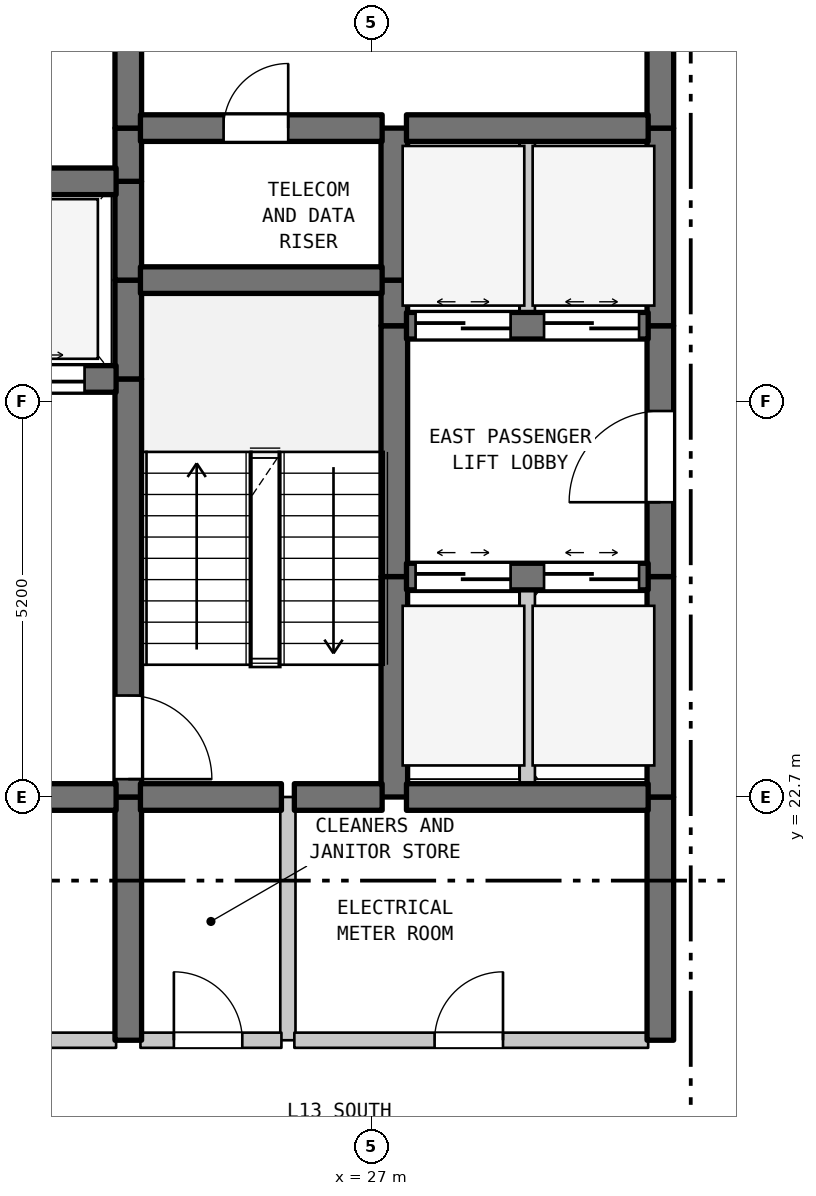
"""IFC4 building model, lengths in metres.
Left out: names, types, materials, properties, quantities, classifications, styles, units other than length and angle.
Written with IfcOpenShell. Run it as: python <this file> out.ifc"""

import sys

from ifc_helpers import new_model, si_unit, direction, frame, frame_2d, origin, place, context, subcontext, project, spatial, rectangle, extrude, element, fill, save


model = new_model("IFC4")
c1 = context("Model", 3, precision=1e-05, world=origin(), true_north=direction((0.0, 1.0)))
c2 = subcontext(c1, "Body", "Model", "MODEL_VIEW")
j1 = project(units=[si_unit("LENGTHUNIT", "METRE"), si_unit("PLANEANGLEUNIT", "RADIAN")], contexts=[c1])
p1 = place(None, origin())
s1 = spatial("IfcSite", under=j1, at=p1, CompositionType="ELEMENT")
p2 = place(p1, origin())
s2 = spatial("IfcBuilding", under=s1, at=p2, CompositionType="ELEMENT")
p3 = place(p2, frame((0.0, 0.0, 57.3)))
s3 = spatial("IfcBuildingStorey", under=s2, at=p3, CompositionType="ELEMENT", Elevation=57.3)
p4 = place(p3, frame((23.8, 19.5, 0.0), z_axis=(0.0, 0.0, 1.0), x_axis=(0.0, 1.0, 0.0)))
e1 = element("IfcWall", 1, at=p4, inside=s3, PredefinedType="SHEAR", context=c2, shape_type="SweptSolid", body=[
    extrude(rectangle(XDim=3.2, YDim=0.35, at=frame_2d((1.6, 0.0))), origin(), (0.0, 0.0, 1.0), 3.28),
])
p5 = place(p3, frame((23.8, 22.7, 0.0), z_axis=(0.0, 0.0, 1.0), x_axis=(0.0, 1.0, 0.0)))
e2 = element("IfcWall", 2, at=p5, inside=s3, PredefinedType="SHEAR", context=c2, shape_type="SweptSolid", body=[
    extrude(rectangle(XDim=5.5, YDim=0.35, at=frame_2d((2.75, 0.0))), origin(), (0.0, 0.0, 1.0), 3.28),
])
p6 = place(p5, frame((0.235, 0.0, 0.0)))
e3 = element("IfcOpeningElement", 3, at=p6, cuts=e2, PredefinedType="OPENING", context=c2, shape_type="SweptSolid", body=[
    extrude(rectangle(XDim=1.1, YDim=2.15, at=frame_2d((0.55, 1.075))), frame((0.0, 0.185, 0.0), z_axis=(0.0, -1.0, 0.0), x_axis=(1.0, 0.0, 0.0)), (0.0, 0.0, 1.0), 0.37),
])
for number, where, z_axis, x_axis in (
    (4, (23.8, 28.2, 0.0), (0.0, 0.0, 1.0), (0.0, 1.0, 0.0)),
    (5, (23.8, 29.5, 0.0), (0.0, 0.0, 1.0), (0.0, 1.0, 0.0)),
):
    element("IfcWall", number, at=place(p3, frame(where, z_axis=z_axis, x_axis=x_axis)), inside=s3, PredefinedType="SHEAR", context=c2, shape_type="SweptSolid", body=[
        extrude(rectangle(XDim=1.3, YDim=0.35, at=frame_2d((0.65, 0.0))), origin(), (0.0, 0.0, 1.0), 3.28),
    ])
p7 = place(p3, frame((23.8, 30.8, 0.0), z_axis=(0.0, 0.0, 1.0), x_axis=(0.0, 1.0, 0.0)))
e6 = element("IfcWall", 6, at=p7, inside=s3, PredefinedType="SHEAR", context=c2, shape_type="SweptSolid", body=[
    extrude(rectangle(XDim=0.7, YDim=0.35, at=frame_2d((0.35, 0.0))), origin(), (0.0, 0.0, 1.0), 3.28),
])
p8 = place(p3, frame((23.8, 31.5, 0.0), z_axis=(0.0, 0.0, 1.0), x_axis=(0.0, 1.0, 0.0)))
e7 = element("IfcWall", 7, at=p8, inside=s3, PredefinedType="SHEAR", context=c2, shape_type="SweptSolid", body=[
    extrude(rectangle(XDim=3.5, YDim=0.35, at=frame_2d((1.75, 0.0))), origin(), (0.0, 0.0, 1.0), 3.28),
])
p9 = place(p8, frame((1.127, 0.0, 0.0)))
e8 = element("IfcOpeningElement", 8, at=p9, cuts=e7, PredefinedType="OPENING", context=c2, shape_type="SweptSolid", body=[
    extrude(rectangle(XDim=1.1, YDim=2.15, at=frame_2d((0.55, 1.075))), frame((0.0, 0.185, 0.0), z_axis=(0.0, -1.0, 0.0), x_axis=(1.0, 0.0, 0.0)), (0.0, 0.0, 1.0), 0.37),
])
p10 = place(p3, frame((25.9, 19.5, 0.0), z_axis=(0.0, 0.0, 1.0), x_axis=(0.0, 1.0, 0.0)))
e9 = element("IfcWall", 9, at=p10, inside=s3, PredefinedType="STANDARD", context=c2, shape_type="SweptSolid", body=[
    extrude(rectangle(XDim=3.2, YDim=0.2, at=frame_2d((1.6, 0.0))), origin(), (0.0, 0.0, 1.0), 3.28),
])
p11 = place(p3, frame((27.3, 22.7, 0.0), z_axis=(0.0, 0.0, 1.0), x_axis=(0.0, 1.0, 0.0)))
e10 = element("IfcWall", 10, at=p11, inside=s3, PredefinedType="SHEAR", context=c2, shape_type="SweptSolid", body=[
    extrude(rectangle(XDim=2.9, YDim=0.35, at=frame_2d((1.45, 0.0))), origin(), (0.0, 0.0, 1.0), 3.28),
])
p12 = place(p3, frame((27.3, 25.6, 0.0), z_axis=(0.0, 0.0, 1.0), x_axis=(0.0, 1.0, 0.0)))
e11 = element("IfcWall", 11, at=p12, inside=s3, PredefinedType="SHEAR", context=c2, shape_type="SweptSolid", body=[
    extrude(rectangle(XDim=3.3, YDim=0.35, at=frame_2d((1.65, 0.0))), origin(), (0.0, 0.0, 1.0), 3.28),
])
p13 = place(p3, frame((27.3, 28.9, 0.0), z_axis=(0.0, 0.0, 1.0), x_axis=(0.0, 1.0, 0.0)))
e12 = element("IfcWall", 12, at=p13, inside=s3, PredefinedType="SHEAR", context=c2, shape_type="SweptSolid", body=[
    extrude(rectangle(XDim=0.6, YDim=0.35, at=frame_2d((0.3, 0.0))), origin(), (0.0, 0.0, 1.0), 3.28),
])
p14 = place(p3, frame((27.3, 29.5, 0.0), z_axis=(0.0, 0.0, 1.0), x_axis=(0.0, 1.0, 0.0)))
e13 = element("IfcWall", 13, at=p14, inside=s3, PredefinedType="SHEAR", context=c2, shape_type="SweptSolid", body=[
    extrude(rectangle(XDim=2.0, YDim=0.35, at=frame_2d((1.0, 0.0))), origin(), (0.0, 0.0, 1.0), 3.28),
])
p15 = place(p3, frame((29.05, 22.7, 0.0), z_axis=(0.0, 0.0, 1.0), x_axis=(0.0, 1.0, 0.0)))
e14 = element("IfcWall", 14, at=p15, inside=s3, PredefinedType="STANDARD", context=c2, shape_type="SweptSolid", body=[
    extrude(rectangle(XDim=2.9, YDim=0.2, at=frame_2d((1.45, 0.0))), origin(), (0.0, 0.0, 1.0), 3.28),
])
p16 = place(p3, frame((29.05, 28.9, 0.0), z_axis=(0.0, 0.0, 1.0), x_axis=(0.0, 1.0, 0.0)))
e15 = element("IfcWall", 15, at=p16, inside=s3, PredefinedType="STANDARD", context=c2, shape_type="SweptSolid", body=[
    extrude(rectangle(XDim=2.6, YDim=0.2, at=frame_2d((1.3, 0.0))), origin(), (0.0, 0.0, 1.0), 3.28),
])
p17 = place(p3, frame((30.8, 19.5, 0.0), z_axis=(0.0, 0.0, 1.0), x_axis=(0.0, 1.0, 0.0)))
e16 = element("IfcWall", 16, at=p17, inside=s3, PredefinedType="SHEAR", context=c2, shape_type="SweptSolid", body=[
    extrude(rectangle(XDim=3.2, YDim=0.35, at=frame_2d((1.6, 0.0))), origin(), (0.0, 0.0, 1.0), 3.28),
])
p18 = place(p3, frame((30.8, 22.7, 0.0), z_axis=(0.0, 0.0, 1.0), x_axis=(0.0, 1.0, 0.0)))
e17 = element("IfcWall", 17, at=p18, inside=s3, PredefinedType="SHEAR", context=c2, shape_type="SweptSolid", body=[
    extrude(rectangle(XDim=2.9, YDim=0.35, at=frame_2d((1.45, 0.0))), origin(), (0.0, 0.0, 1.0), 3.28),
])
p19 = place(p3, frame((30.8, 25.6, 0.0), z_axis=(0.0, 0.0, 1.0), x_axis=(0.0, 1.0, 0.0)))
e18 = element("IfcWall", 18, at=p19, inside=s3, PredefinedType="SHEAR", context=c2, shape_type="SweptSolid", body=[
    extrude(rectangle(XDim=3.3, YDim=0.35, at=frame_2d((1.65, 0.0))), origin(), (0.0, 0.0, 1.0), 3.28),
])
p20 = place(p19, frame((0.978, 0.0, 0.0)))
e19 = element("IfcOpeningElement", 19, at=p20, cuts=e18, PredefinedType="OPENING", context=c2, shape_type="SweptSolid", body=[
    extrude(rectangle(XDim=1.2, YDim=2.2, at=frame_2d((0.6, 1.1))), frame((0.0, 0.185, 0.0), z_axis=(0.0, -1.0, 0.0), x_axis=(1.0, 0.0, 0.0)), (0.0, 0.0, 1.0), 0.37),
])
p21 = place(p3, frame((30.8, 28.9, 0.0), z_axis=(0.0, 0.0, 1.0), x_axis=(0.0, 1.0, 0.0)))
e20 = element("IfcWall", 20, at=p21, inside=s3, PredefinedType="SHEAR", context=c2, shape_type="SweptSolid", body=[
    extrude(rectangle(XDim=2.6, YDim=0.35, at=frame_2d((1.3, 0.0))), origin(), (0.0, 0.0, 1.0), 3.28),
])
p22 = place(p3, frame((30.8, 31.5, 0.0), z_axis=(0.0, 0.0, 1.0), x_axis=(0.0, 1.0, 0.0)))
e21 = element("IfcWall", 21, at=p22, inside=s3, PredefinedType="SHEAR", context=c2, shape_type="SweptSolid", body=[
    extrude(rectangle(XDim=3.5, YDim=0.35, at=frame_2d((1.75, 0.0))), origin(), (0.0, 0.0, 1.0), 3.28),
])
p23 = place(p22, frame((1.15, 0.0, 0.0)))
e22 = element("IfcOpeningElement", 22, at=p23, cuts=e21, PredefinedType="OPENING", context=c2, shape_type="SweptSolid", body=[
    extrude(rectangle(XDim=1.2, YDim=2.2, at=frame_2d((0.6, 1.1))), frame((0.0, 0.185, 0.0), z_axis=(0.0, -1.0, 0.0), x_axis=(1.0, 0.0, 0.0)), (0.0, 0.0, 1.0), 0.37),
])
p24 = place(p3, frame((19.16, 19.5, 0.0), z_axis=(0.0, 0.0, 1.0), x_axis=(1.0, 0.0, 0.0)))
e23 = element("IfcWall", 23, at=p24, inside=s3, PredefinedType="STANDARD", context=c2, shape_type="SweptSolid", body=[
    extrude(rectangle(XDim=4.48, YDim=0.2, at=frame_2d((2.24, 0.0))), origin(), (0.0, 0.0, 1.0), 3.28),
])
p25 = place(p24, frame((1.64, 0.0, 0.0)))
e24 = element("IfcOpeningElement", 24, at=p25, cuts=e23, PredefinedType="OPENING", context=c2, shape_type="SweptSolid", body=[
    extrude(rectangle(XDim=1.2, YDim=2.2, at=frame_2d((0.6, 1.1))), frame((0.0, 0.11, 0.0), z_axis=(0.0, -1.0, 0.0), x_axis=(1.0, 0.0, 0.0)), (0.0, 0.0, 1.0), 0.22),
])
p26 = place(p3, frame((23.96, 19.5, 0.0), z_axis=(0.0, 0.0, 1.0), x_axis=(1.0, 0.0, 0.0)))
e25 = element("IfcWall", 25, at=p26, inside=s3, PredefinedType="STANDARD", context=c2, shape_type="SweptSolid", body=[
    extrude(rectangle(XDim=1.855, YDim=0.2, at=frame_2d((0.927, 0.0))), origin(), (0.0, 0.0, 1.0), 3.28),
])
p27 = place(p26, frame((0.44, 0.0, 0.0)))
e26 = element("IfcOpeningElement", 26, at=p27, cuts=e25, PredefinedType="OPENING", context=c2, shape_type="SweptSolid", body=[
    extrude(rectangle(XDim=0.9, YDim=2.15, at=frame_2d((0.45, 1.075))), frame((0.0, 0.11, 0.0), z_axis=(0.0, -1.0, 0.0), x_axis=(1.0, 0.0, 0.0)), (0.0, 0.0, 1.0), 0.22),
])
p28 = place(p3, frame((25.985, 19.5, 0.0), z_axis=(0.0, 0.0, 1.0), x_axis=(1.0, 0.0, 0.0)))
e27 = element("IfcWall", 27, at=p28, inside=s3, PredefinedType="STANDARD", context=c2, shape_type="SweptSolid", body=[
    extrude(rectangle(XDim=4.655, YDim=0.2, at=frame_2d((2.327, 0.0))), origin(), (0.0, 0.0, 1.0), 3.28),
])
p29 = place(p28, frame((1.845, 0.0, 0.0)))
e28 = element("IfcOpeningElement", 28, at=p29, cuts=e27, PredefinedType="OPENING", context=c2, shape_type="SweptSolid", body=[
    extrude(rectangle(XDim=0.9, YDim=2.15, at=frame_2d((0.45, 1.075))), frame((0.0, 0.11, 0.0), z_axis=(0.0, -1.0, 0.0), x_axis=(1.0, 0.0, 0.0)), (0.0, 0.0, 1.0), 0.22),
])
p30 = place(p3, frame((19.16, 22.7, 0.0), z_axis=(0.0, 0.0, 1.0), x_axis=(1.0, 0.0, 0.0)))
e29 = element("IfcWall", 29, at=p30, inside=s3, PredefinedType="SHEAR", context=c2, shape_type="SweptSolid", body=[
    extrude(rectangle(XDim=4.48, YDim=0.35, at=frame_2d((2.24, 0.0))), origin(), (0.0, 0.0, 1.0), 3.28),
])
p31 = place(p30, frame((1.64, 0.0, 0.0)))
e30 = element("IfcOpeningElement", 30, at=p31, cuts=e29, PredefinedType="OPENING", context=c2, shape_type="SweptSolid", body=[
    extrude(rectangle(XDim=1.2, YDim=2.2, at=frame_2d((0.6, 1.1))), frame((0.0, 0.185, 0.0), z_axis=(0.0, -1.0, 0.0), x_axis=(1.0, 0.0, 0.0)), (0.0, 0.0, 1.0), 0.37),
])
p32 = place(p3, frame((23.96, 22.7, 0.0), z_axis=(0.0, 0.0, 1.0), x_axis=(1.0, 0.0, 0.0)))
e31 = element("IfcWall", 31, at=p32, inside=s3, PredefinedType="SHEAR", context=c2, shape_type="SweptSolid", body=[
    extrude(rectangle(XDim=1.855, YDim=0.35, at=frame_2d((0.927, 0.0))), origin(), (0.0, 0.0, 1.0), 3.28),
])
p33 = place(p3, frame((25.985, 22.7, 0.0), z_axis=(0.0, 0.0, 1.0), x_axis=(1.0, 0.0, 0.0)))
e32 = element("IfcWall", 32, at=p33, inside=s3, PredefinedType="SHEAR", context=c2, shape_type="SweptSolid", body=[
    extrude(rectangle(XDim=1.155, YDim=0.35, at=frame_2d((0.577, 0.0))), origin(), (0.0, 0.0, 1.0), 3.28),
])
p34 = place(p3, frame((27.46, 22.7, 0.0), z_axis=(0.0, 0.0, 1.0), x_axis=(1.0, 0.0, 0.0)))
e33 = element("IfcWall", 33, at=p34, inside=s3, PredefinedType="SHEAR", context=c2, shape_type="SweptSolid", body=[
    extrude(rectangle(XDim=3.18, YDim=0.35, at=frame_2d((1.59, 0.0))), origin(), (0.0, 0.0, 1.0), 3.28),
])
p35 = place(p3, frame((27.46, 25.6, 0.0), z_axis=(0.0, 0.0, 1.0), x_axis=(1.0, 0.0, 0.0)))
e34 = element("IfcWall", 34, at=p35, inside=s3, PredefinedType="SHEAR", context=c2, shape_type="SweptSolid", body=[
    extrude(rectangle(XDim=3.18, YDim=0.35, at=frame_2d((1.59, 0.0))), origin(), (0.0, 0.0, 1.0), 3.28),
])
p36 = place(p35, frame((0.12, 0.0, 0.0)))
e35 = element("IfcOpeningElement", 35, at=p36, cuts=e34, PredefinedType="OPENING", context=c2, shape_type="SweptSolid", body=[
    extrude(rectangle(XDim=1.25, YDim=2.2, at=frame_2d((0.625, 1.1))), frame((0.0, 0.185, 0.0), z_axis=(0.0, -1.0, 0.0), x_axis=(1.0, 0.0, 0.0)), (0.0, 0.0, 1.0), 0.37),
])
p37 = place(p35, frame((1.81, 0.0, 0.0)))
e36 = element("IfcOpeningElement", 36, at=p37, cuts=e34, PredefinedType="OPENING", context=c2, shape_type="SweptSolid", body=[
    extrude(rectangle(XDim=1.25, YDim=2.2, at=frame_2d((0.625, 1.1))), frame((0.0, 0.185, 0.0), z_axis=(0.0, -1.0, 0.0), x_axis=(1.0, 0.0, 0.0)), (0.0, 0.0, 1.0), 0.37),
])
p38 = place(p3, frame((19.16, 28.2, 0.0), z_axis=(0.0, 0.0, 1.0), x_axis=(1.0, 0.0, 0.0)))
e37 = element("IfcWall", 37, at=p38, inside=s3, PredefinedType="SHEAR", context=c2, shape_type="SweptSolid", body=[
    extrude(rectangle(XDim=4.48, YDim=0.35, at=frame_2d((2.24, 0.0))), origin(), (0.0, 0.0, 1.0), 3.28),
])
p39 = place(p38, frame((0.415, 0.0, 0.0)))
e38 = element("IfcOpeningElement", 38, at=p39, cuts=e37, PredefinedType="OPENING", context=c2, shape_type="SweptSolid", body=[
    extrude(rectangle(XDim=1.25, YDim=2.2, at=frame_2d((0.625, 1.1))), frame((0.0, 0.185, 0.0), z_axis=(0.0, -1.0, 0.0), x_axis=(1.0, 0.0, 0.0)), (0.0, 0.0, 1.0), 0.37),
])
p40 = place(p38, frame((2.815, 0.0, 0.0)))
e39 = element("IfcOpeningElement", 39, at=p40, cuts=e37, PredefinedType="OPENING", context=c2, shape_type="SweptSolid", body=[
    extrude(rectangle(XDim=1.25, YDim=2.2, at=frame_2d((0.625, 1.1))), frame((0.0, 0.185, 0.0), z_axis=(0.0, -1.0, 0.0), x_axis=(1.0, 0.0, 0.0)), (0.0, 0.0, 1.0), 0.37),
])
p41 = place(p3, frame((27.46, 28.9, 0.0), z_axis=(0.0, 0.0, 1.0), x_axis=(1.0, 0.0, 0.0)))
e40 = element("IfcWall", 40, at=p41, inside=s3, PredefinedType="SHEAR", context=c2, shape_type="SweptSolid", body=[
    extrude(rectangle(XDim=3.18, YDim=0.35, at=frame_2d((1.59, 0.0))), origin(), (0.0, 0.0, 1.0), 3.28),
])
p42 = place(p41, frame((0.12, 0.0, 0.0)))
e41 = element("IfcOpeningElement", 41, at=p42, cuts=e40, PredefinedType="OPENING", context=c2, shape_type="SweptSolid", body=[
    extrude(rectangle(XDim=1.25, YDim=2.2, at=frame_2d((0.625, 1.1))), frame((0.0, 0.185, 0.0), z_axis=(0.0, -1.0, 0.0), x_axis=(1.0, 0.0, 0.0)), (0.0, 0.0, 1.0), 0.37),
])
p43 = place(p41, frame((1.81, 0.0, 0.0)))
e42 = element("IfcOpeningElement", 42, at=p43, cuts=e40, PredefinedType="OPENING", context=c2, shape_type="SweptSolid", body=[
    extrude(rectangle(XDim=1.25, YDim=2.2, at=frame_2d((0.625, 1.1))), frame((0.0, 0.185, 0.0), z_axis=(0.0, -1.0, 0.0), x_axis=(1.0, 0.0, 0.0)), (0.0, 0.0, 1.0), 0.37),
])
p44 = place(p3, frame((23.96, 29.5, 0.0), z_axis=(0.0, 0.0, 1.0), x_axis=(1.0, 0.0, 0.0)))
e43 = element("IfcWall", 43, at=p44, inside=s3, PredefinedType="SHEAR", context=c2, shape_type="SweptSolid", body=[
    extrude(rectangle(XDim=3.18, YDim=0.35, at=frame_2d((1.59, 0.0))), origin(), (0.0, 0.0, 1.0), 3.28),
])
p45 = place(p3, frame((19.16, 30.8, 0.0), z_axis=(0.0, 0.0, 1.0), x_axis=(1.0, 0.0, 0.0)))
e44 = element("IfcWall", 44, at=p45, inside=s3, PredefinedType="SHEAR", context=c2, shape_type="SweptSolid", body=[
    extrude(rectangle(XDim=4.48, YDim=0.35, at=frame_2d((2.24, 0.0))), origin(), (0.0, 0.0, 1.0), 3.28),
])
p46 = place(p3, frame((23.96, 31.5, 0.0), z_axis=(0.0, 0.0, 1.0), x_axis=(1.0, 0.0, 0.0)))
e45 = element("IfcWall", 45, at=p46, inside=s3, PredefinedType="SHEAR", context=c2, shape_type="SweptSolid", body=[
    extrude(rectangle(XDim=3.18, YDim=0.35, at=frame_2d((1.59, 0.0))), origin(), (0.0, 0.0, 1.0), 3.28),
])
p47 = place(p46, frame((1.094, 0.0, 0.0)))
e46 = element("IfcOpeningElement", 46, at=p47, cuts=e45, PredefinedType="OPENING", context=c2, shape_type="SweptSolid", body=[
    extrude(rectangle(XDim=0.85, YDim=2.1, at=frame_2d((0.425, 1.05))), frame((0.0, 0.185, 0.0), z_axis=(0.0, -1.0, 0.0), x_axis=(1.0, 0.0, 0.0)), (0.0, 0.0, 1.0), 0.37),
])
p48 = place(p3, frame((27.46, 31.5, 0.0), z_axis=(0.0, 0.0, 1.0), x_axis=(1.0, 0.0, 0.0)))
e47 = element("IfcWall", 47, at=p48, inside=s3, PredefinedType="SHEAR", context=c2, shape_type="SweptSolid", body=[
    extrude(rectangle(XDim=3.18, YDim=0.35, at=frame_2d((1.59, 0.0))), origin(), (0.0, 0.0, 1.0), 3.28),
])
p49 = place(p6, frame((1.1, 0.0, 0.0), z_axis=(0.0, 0.0, 1.0), x_axis=(-1.0, 0.0, 0.0)))
e48 = element("IfcDoor", 48, at=p49, inside=s3, OperationType="SINGLE_SWING_LEFT", PredefinedType="DOOR", context=c2, shape_type="SweptSolid", body=[
    extrude(rectangle(XDim=1.1, YDim=2.15, at=frame_2d((0.55, 1.075))), frame((0.0, 0.025, 0.0), z_axis=(0.0, -1.0, 0.0), x_axis=(1.0, 0.0, 0.0)), (0.0, 0.0, 1.0), 0.05),
])
fill(e3, e48)
p50 = place(p20, origin())
e49 = element("IfcDoor", 49, at=p50, inside=s3, OperationType="SINGLE_SWING_LEFT", PredefinedType="DOOR", context=c2, shape_type="SweptSolid", body=[
    extrude(rectangle(XDim=1.2, YDim=2.2, at=frame_2d((0.6, 1.1))), frame((0.0, 0.025, 0.0), z_axis=(0.0, -1.0, 0.0), x_axis=(1.0, 0.0, 0.0)), (0.0, 0.0, 1.0), 0.05),
])
fill(e19, e49)
p51 = place(p27, origin())
e50 = element("IfcDoor", 50, at=p51, inside=s3, OperationType="SINGLE_SWING_LEFT", PredefinedType="DOOR", context=c2, shape_type="SweptSolid", body=[
    extrude(rectangle(XDim=0.9, YDim=2.15, at=frame_2d((0.45, 1.075))), frame((0.0, 0.025, 0.0), z_axis=(0.0, -1.0, 0.0), x_axis=(1.0, 0.0, 0.0)), (0.0, 0.0, 1.0), 0.05),
])
fill(e26, e50)
p52 = place(p29, origin())
e51 = element("IfcDoor", 51, at=p52, inside=s3, OperationType="SINGLE_SWING_RIGHT", PredefinedType="DOOR", context=c2, shape_type="SweptSolid", body=[
    extrude(rectangle(XDim=0.9, YDim=2.15, at=frame_2d((0.45, 1.075))), frame((0.0, 0.025, 0.0), z_axis=(0.0, -1.0, 0.0), x_axis=(1.0, 0.0, 0.0)), (0.0, 0.0, 1.0), 0.05),
])
fill(e28, e51)
p53 = place(p36, origin())
e52 = element("IfcDoor", 52, at=p53, inside=s3, OperationType="DOUBLE_DOOR_SLIDING", PredefinedType="DOOR", context=c2, shape_type="SweptSolid", body=[
    extrude(rectangle(XDim=1.25, YDim=2.2, at=frame_2d((0.625, 1.1))), frame((0.0, 0.025, 0.0), z_axis=(0.0, -1.0, 0.0), x_axis=(1.0, 0.0, 0.0)), (0.0, 0.0, 1.0), 0.05),
])
fill(e35, e52)
p54 = place(p37, origin())
e53 = element("IfcDoor", 53, at=p54, inside=s3, OperationType="DOUBLE_DOOR_SLIDING", PredefinedType="DOOR", context=c2, shape_type="SweptSolid", body=[
    extrude(rectangle(XDim=1.25, YDim=2.2, at=frame_2d((0.625, 1.1))), frame((0.0, 0.025, 0.0), z_axis=(0.0, -1.0, 0.0), x_axis=(1.0, 0.0, 0.0)), (0.0, 0.0, 1.0), 0.05),
])
fill(e36, e53)
p55 = place(p40, origin())
e54 = element("IfcDoor", 54, at=p55, inside=s3, OperationType="DOUBLE_DOOR_SLIDING", PredefinedType="DOOR", context=c2, shape_type="SweptSolid", body=[
    extrude(rectangle(XDim=1.25, YDim=2.2, at=frame_2d((0.625, 1.1))), frame((0.0, 0.025, 0.0), z_axis=(0.0, -1.0, 0.0), x_axis=(1.0, 0.0, 0.0)), (0.0, 0.0, 1.0), 0.05),
])
fill(e39, e54)
p56 = place(p42, origin())
e55 = element("IfcDoor", 55, at=p56, inside=s3, OperationType="DOUBLE_DOOR_SLIDING", PredefinedType="DOOR", context=c2, shape_type="SweptSolid", body=[
    extrude(rectangle(XDim=1.25, YDim=2.2, at=frame_2d((0.625, 1.1))), frame((0.0, 0.025, 0.0), z_axis=(0.0, -1.0, 0.0), x_axis=(1.0, 0.0, 0.0)), (0.0, 0.0, 1.0), 0.05),
])
fill(e41, e55)
p57 = place(p43, origin())
e56 = element("IfcDoor", 56, at=p57, inside=s3, OperationType="DOUBLE_DOOR_SLIDING", PredefinedType="DOOR", context=c2, shape_type="SweptSolid", body=[
    extrude(rectangle(XDim=1.25, YDim=2.2, at=frame_2d((0.625, 1.1))), frame((0.0, 0.025, 0.0), z_axis=(0.0, -1.0, 0.0), x_axis=(1.0, 0.0, 0.0)), (0.0, 0.0, 1.0), 0.05),
])
fill(e42, e56)
p58 = place(p47, origin())
e57 = element("IfcDoor", 57, at=p58, inside=s3, OperationType="SINGLE_SWING_RIGHT", PredefinedType="DOOR", context=c2, shape_type="SweptSolid", body=[
    extrude(rectangle(XDim=0.85, YDim=2.1, at=frame_2d((0.425, 1.05))), frame((0.0, 0.025, 0.0), z_axis=(0.0, -1.0, 0.0), x_axis=(1.0, 0.0, 0.0)), (0.0, 0.0, 1.0), 0.05),
])
fill(e46, e57)
save(model, sys.argv[1])
